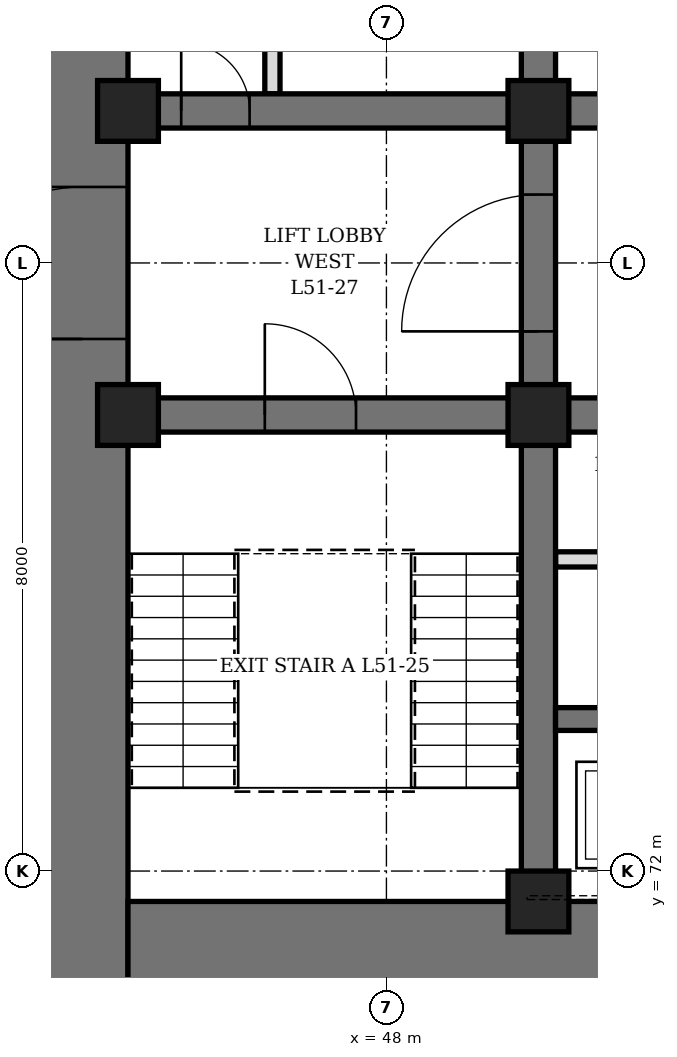
"""IFC4 building model, lengths in metres.
Left out: names, types, materials, properties, quantities, classifications, styles, units other than length and angle.
Written with IfcOpenShell. Run it as: python <this file> out.ifc"""

import sys

from ifc_helpers import new_model, si_unit, direction, frame, frame_2d, origin, origin_2d, place, context, subcontext, project, spatial, rectangle, hollow_rectangle, extrude, element, fill, save


model = new_model("IFC4")
c1 = context("Model", 3, precision=1e-05, world=origin(), true_north=direction((0.0, 1.0)))
c2 = subcontext(c1, "Body", "Model", "MODEL_VIEW")
j1 = project(units=[si_unit("LENGTHUNIT", "METRE"), si_unit("PLANEANGLEUNIT", "RADIAN")], contexts=[c1])
p1 = place(None, origin())
s1 = spatial("IfcSite", under=j1, at=p1, CompositionType="ELEMENT")
p2 = place(p1, origin())
s2 = spatial("IfcBuilding", under=s1, at=p2, CompositionType="ELEMENT")
p3 = place(p2, frame((0.0, 0.0, 227.5)))
s3 = spatial("IfcBuildingStorey", under=s2, at=p3, CompositionType="ELEMENT", Elevation=227.5)
p4 = place(p3, frame((44.0, 70.4, 0.0), z_axis=(0.0, 0.0, 1.0), x_axis=(0.0, 1.0, 0.0)))
e1 = element("IfcWall", 1, at=p4, inside=s3, PredefinedType="SHEAR", context=c2, shape_type="SweptSolid", body=[
    extrude(rectangle(XDim=19.2, YDim=1.2, at=frame_2d((9.6, 0.0))), origin(), (0.0, 0.0, 1.0), 4.2),
])
p5 = place(p4, frame((8.6, 0.0, 0.0)))
e2 = element("IfcOpeningElement", 2, at=p5, cuts=e1, PredefinedType="OPENING", context=c2, shape_type="SweptSolid", body=[
    extrude(rectangle(XDim=2.0, YDim=2.4, at=frame_2d((1.0, 1.2))), frame((0.0, 0.61, 0.0), z_axis=(0.0, -1.0, 0.0), x_axis=(1.0, 0.0, 0.0)), (0.0, 0.0, 1.0), 1.22),
])
p6 = place(p3, frame((44.6, 71.0, 0.0), z_axis=(0.0, 0.0, 1.0), x_axis=(1.0, 0.0, 0.0)))
e3 = element("IfcWall", 3, at=p6, inside=s3, PredefinedType="SHEAR", context=c2, shape_type="SweptSolid", body=[
    extrude(rectangle(XDim=22.8, YDim=1.2, at=frame_2d((11.4, 0.0))), origin(), (0.0, 0.0, 1.0), 4.2),
])
p7 = place(p6, frame((6.35, 0.0, 0.0)))
e4 = element("IfcOpeningElement", 4, at=p7, cuts=e3, PredefinedType="OPENING", context=c2, shape_type="SweptSolid", body=[
    extrude(rectangle(XDim=1.1, YDim=2.2, at=frame_2d((0.55, 1.1))), frame((0.0, 0.61, 0.0), z_axis=(0.0, -1.0, 0.0), x_axis=(1.0, 0.0, 0.0)), (0.0, 0.0, 1.0), 1.22),
])
p8 = place(p6, frame((9.35, 0.0, 0.0)))
e5 = element("IfcOpeningElement", 5, at=p8, cuts=e3, PredefinedType="OPENING", context=c2, shape_type="SweptSolid", body=[
    extrude(rectangle(XDim=1.1, YDim=2.2, at=frame_2d((0.55, 1.1))), frame((0.0, 0.61, 0.0), z_axis=(0.0, -1.0, 0.0), x_axis=(1.0, 0.0, 0.0)), (0.0, 0.0, 1.0), 1.22),
])
p9 = place(p6, frame((12.35, 0.0, 0.0)))
e6 = element("IfcOpeningElement", 6, at=p9, cuts=e3, PredefinedType="OPENING", context=c2, shape_type="SweptSolid", body=[
    extrude(rectangle(XDim=1.1, YDim=2.2, at=frame_2d((0.55, 1.1))), frame((0.0, 0.61, 0.0), z_axis=(0.0, -1.0, 0.0), x_axis=(1.0, 0.0, 0.0)), (0.0, 0.0, 1.0), 1.22),
])
p10 = place(p6, frame((15.35, 0.0, 0.0)))
e7 = element("IfcOpeningElement", 7, at=p10, cuts=e3, PredefinedType="OPENING", context=c2, shape_type="SweptSolid", body=[
    extrude(rectangle(XDim=1.1, YDim=2.2, at=frame_2d((0.55, 1.1))), frame((0.0, 0.61, 0.0), z_axis=(0.0, -1.0, 0.0), x_axis=(1.0, 0.0, 0.0)), (0.0, 0.0, 1.0), 1.22),
])
p11 = place(p3, frame((50.0, 71.6, 0.0), z_axis=(0.0, 0.0, 1.0), x_axis=(0.0, 1.0, 0.0)))
e8 = element("IfcWall", 8, at=p11, inside=s3, PredefinedType="SHEAR", context=c2, shape_type="SweptSolid", body=[
    extrude(rectangle(XDim=16.8, YDim=0.45, at=frame_2d((8.4, 0.0))), origin(), (0.0, 0.0, 1.0), 4.2),
])
p12 = place(p11, frame((7.5, 0.0, 0.0)))
e9 = element("IfcOpeningElement", 9, at=p12, cuts=e8, PredefinedType="OPENING", context=c2, shape_type="SweptSolid", body=[
    extrude(rectangle(XDim=1.8, YDim=2.4, at=frame_2d((0.9, 1.2))), frame((0.0, 0.235, 0.0), z_axis=(0.0, -1.0, 0.0), x_axis=(1.0, 0.0, 0.0)), (0.0, 0.0, 1.0), 0.47),
])
p13 = place(p3, frame((44.6, 78.0, 0.0), z_axis=(0.0, 0.0, 1.0), x_axis=(1.0, 0.0, 0.0)))
e10 = element("IfcWall", 10, at=p13, inside=s3, PredefinedType="SHEAR", context=c2, shape_type="SweptSolid", body=[
    extrude(rectangle(XDim=5.175, YDim=0.45, at=frame_2d((2.587, 0.0))), origin(), (0.0, 0.0, 1.0), 4.2),
])
p14 = place(p13, frame((1.8, 0.0, 0.0)))
e11 = element("IfcOpeningElement", 11, at=p14, cuts=e10, PredefinedType="OPENING", context=c2, shape_type="SweptSolid", body=[
    extrude(rectangle(XDim=1.2, YDim=2.1, at=frame_2d((0.6, 1.05))), frame((0.0, 0.235, 0.0), z_axis=(0.0, -1.0, 0.0), x_axis=(1.0, 0.0, 0.0)), (0.0, 0.0, 1.0), 0.47),
])
p15 = place(p3, frame((44.6, 82.0, 0.0), z_axis=(0.0, 0.0, 1.0), x_axis=(1.0, 0.0, 0.0)))
e12 = element("IfcWall", 12, at=p15, inside=s3, PredefinedType="SHEAR", context=c2, shape_type="SweptSolid", body=[
    extrude(rectangle(XDim=5.175, YDim=0.45, at=frame_2d((2.587, 0.0))), origin(), (0.0, 0.0, 1.0), 4.2),
])
p16 = place(p15, frame((0.7, 0.0, 0.0)))
e13 = element("IfcOpeningElement", 13, at=p16, cuts=e12, PredefinedType="OPENING", context=c2, shape_type="SweptSolid", body=[
    extrude(rectangle(XDim=0.9, YDim=2.1, at=frame_2d((0.45, 1.05))), frame((0.0, 0.235, 0.0), z_axis=(0.0, -1.0, 0.0), x_axis=(1.0, 0.0, 0.0)), (0.0, 0.0, 1.0), 0.47),
])
p17 = place(p3, frame((50.225, 78.0, 0.0), z_axis=(0.0, 0.0, 1.0), x_axis=(1.0, 0.0, 0.0)))
e14 = element("IfcWall", 14, at=p17, inside=s3, PredefinedType="SHEAR", context=c2, shape_type="SweptSolid", body=[
    extrude(rectangle(XDim=11.55, YDim=0.45, at=frame_2d((5.775, 0.0))), origin(), (0.0, 0.0, 1.0), 4.2),
])
p18 = place(p17, frame((0.825, 0.0, 0.0)))
e15 = element("IfcOpeningElement", 15, at=p18, cuts=e14, PredefinedType="OPENING", context=c2, shape_type="SweptSolid", body=[
    extrude(rectangle(XDim=0.9, YDim=2.1, at=frame_2d((0.45, 1.05))), frame((0.0, 0.235, 0.0), z_axis=(0.0, -1.0, 0.0), x_axis=(1.0, 0.0, 0.0)), (0.0, 0.0, 1.0), 0.47),
])
p19 = place(p17, frame((3.825, 0.0, 0.0)))
e16 = element("IfcOpeningElement", 16, at=p19, cuts=e14, PredefinedType="OPENING", context=c2, shape_type="SweptSolid", body=[
    extrude(rectangle(XDim=0.9, YDim=2.1, at=frame_2d((0.45, 1.05))), frame((0.0, 0.235, 0.0), z_axis=(0.0, -1.0, 0.0), x_axis=(1.0, 0.0, 0.0)), (0.0, 0.0, 1.0), 0.47),
])
p20 = place(p17, frame((6.825, 0.0, 0.0)))
e17 = element("IfcOpeningElement", 17, at=p20, cuts=e14, PredefinedType="OPENING", context=c2, shape_type="SweptSolid", body=[
    extrude(rectangle(XDim=0.9, YDim=2.1, at=frame_2d((0.45, 1.05))), frame((0.0, 0.235, 0.0), z_axis=(0.0, -1.0, 0.0), x_axis=(1.0, 0.0, 0.0)), (0.0, 0.0, 1.0), 0.47),
])
p21 = place(p17, frame((9.825, 0.0, 0.0)))
e18 = element("IfcOpeningElement", 18, at=p21, cuts=e14, PredefinedType="OPENING", context=c2, shape_type="SweptSolid", body=[
    extrude(rectangle(XDim=0.9, YDim=2.1, at=frame_2d((0.45, 1.05))), frame((0.0, 0.235, 0.0), z_axis=(0.0, -1.0, 0.0), x_axis=(1.0, 0.0, 0.0)), (0.0, 0.0, 1.0), 0.47),
])
p22 = place(p3, frame((50.225, 82.0, 0.0), z_axis=(0.0, 0.0, 1.0), x_axis=(1.0, 0.0, 0.0)))
e19 = element("IfcWall", 19, at=p22, inside=s3, PredefinedType="SHEAR", context=c2, shape_type="SweptSolid", body=[
    extrude(rectangle(XDim=11.55, YDim=0.45, at=frame_2d((5.775, 0.0))), origin(), (0.0, 0.0, 1.0), 4.2),
])
p23 = place(p22, frame((0.825, 0.0, 0.0)))
e20 = element("IfcOpeningElement", 20, at=p23, cuts=e19, PredefinedType="OPENING", context=c2, shape_type="SweptSolid", body=[
    extrude(rectangle(XDim=0.9, YDim=2.1, at=frame_2d((0.45, 1.05))), frame((0.0, 0.235, 0.0), z_axis=(0.0, -1.0, 0.0), x_axis=(1.0, 0.0, 0.0)), (0.0, 0.0, 1.0), 0.47),
])
p24 = place(p22, frame((3.825, 0.0, 0.0)))
e21 = element("IfcOpeningElement", 21, at=p24, cuts=e19, PredefinedType="OPENING", context=c2, shape_type="SweptSolid", body=[
    extrude(rectangle(XDim=0.9, YDim=2.1, at=frame_2d((0.45, 1.05))), frame((0.0, 0.235, 0.0), z_axis=(0.0, -1.0, 0.0), x_axis=(1.0, 0.0, 0.0)), (0.0, 0.0, 1.0), 0.47),
])
p25 = place(p22, frame((6.825, 0.0, 0.0)))
e22 = element("IfcOpeningElement", 22, at=p25, cuts=e19, PredefinedType="OPENING", context=c2, shape_type="SweptSolid", body=[
    extrude(rectangle(XDim=0.9, YDim=2.1, at=frame_2d((0.45, 1.05))), frame((0.0, 0.235, 0.0), z_axis=(0.0, -1.0, 0.0), x_axis=(1.0, 0.0, 0.0)), (0.0, 0.0, 1.0), 0.47),
])
p26 = place(p22, frame((9.825, 0.0, 0.0)))
e23 = element("IfcOpeningElement", 23, at=p26, cuts=e19, PredefinedType="OPENING", context=c2, shape_type="SweptSolid", body=[
    extrude(rectangle(XDim=0.9, YDim=2.1, at=frame_2d((0.45, 1.05))), frame((0.0, 0.235, 0.0), z_axis=(0.0, -1.0, 0.0), x_axis=(1.0, 0.0, 0.0)), (0.0, 0.0, 1.0), 0.47),
])
p27 = place(p3, frame((50.225, 74.0, 0.0), z_axis=(0.0, 0.0, 1.0), x_axis=(1.0, 0.0, 0.0)))
e24 = element("IfcWall", 24, at=p27, inside=s3, PredefinedType="SHEAR", context=c2, shape_type="SweptSolid", body=[
    extrude(rectangle(XDim=11.55, YDim=0.3, at=frame_2d((5.775, 0.0))), origin(), (0.0, 0.0, 1.0), 4.2),
])
for number, where, z_axis, x_axis in (
    (25, (44.6, 78.0, 0.0), (0.0, 0.0, 1.0), (1.0, 0.0, 0.0)),
    (26, (44.6, 82.0, 0.0), (0.0, 0.0, 1.0), (1.0, 0.0, 0.0)),
    (27, (50.0, 71.6, 0.0), (0.0, 0.0, 1.0), (1.0, 0.0, 0.0)),
    (28, (50.0, 78.0, 0.0), (0.0, 0.0, 1.0), (1.0, 0.0, 0.0)),
    (29, (50.0, 82.0, 0.0), (0.0, 0.0, 1.0), (1.0, 0.0, 0.0)),
):
    element("IfcColumn", number, at=place(p3, frame(where, z_axis=z_axis, x_axis=x_axis)), inside=s3, PredefinedType="COLUMN", context=c2, shape_type="SweptSolid", body=[
        extrude(hollow_rectangle(XDim=0.8, YDim=0.8, WallThickness=0.1, at=origin_2d()), origin(), (0.0, 0.0, 1.0), 4.2),
    ])
p28 = place(p3, frame((46.5, 82.225, 0.0), z_axis=(0.0, 0.0, 1.0), x_axis=(0.0, 1.0, 0.0)))
e30 = element("IfcWall", 30, at=p28, inside=s3, PredefinedType="PARTITIONING", context=c2, shape_type="SweptSolid", body=[
    extrude(rectangle(XDim=3.05, YDim=0.2, at=frame_2d((1.525, 0.0))), origin(), (0.0, 0.0, 1.0), 4.04),
])
p29 = place(p28, frame((1.075, 0.0, 0.0)))
e31 = element("IfcOpeningElement", 31, at=p29, cuts=e30, PredefinedType="OPENING", context=c2, shape_type="SweptSolid", body=[
    extrude(rectangle(XDim=0.9, YDim=2.1, at=frame_2d((0.45, 1.05))), frame((0.0, 0.11, 0.0), z_axis=(0.0, -1.0, 0.0), x_axis=(1.0, 0.0, 0.0)), (0.0, 0.0, 1.0), 0.22),
])
p30 = place(p3, frame((50.225, 76.1, 0.0), z_axis=(0.0, 0.0, 1.0), x_axis=(1.0, 0.0, 0.0)))
e32 = element("IfcWall", 32, at=p30, inside=s3, PredefinedType="PARTITIONING", context=c2, shape_type="SweptSolid", body=[
    extrude(rectangle(XDim=2.55, YDim=0.2, at=frame_2d((1.275, 0.0))), origin(), (0.0, 0.0, 1.0), 4.04),
])
p31 = place(p30, frame((0.825, 0.0, 0.0)))
e33 = element("IfcOpeningElement", 33, at=p31, cuts=e32, PredefinedType="OPENING", context=c2, shape_type="SweptSolid", body=[
    extrude(rectangle(XDim=0.9, YDim=2.1, at=frame_2d((0.45, 1.05))), frame((0.0, 0.11, 0.0), z_axis=(0.0, -1.0, 0.0), x_axis=(1.0, 0.0, 0.0)), (0.0, 0.0, 1.0), 0.22),
])
p32 = place(p16, origin())
e34 = element("IfcDoor", 34, at=p32, inside=s3, OperationType="SINGLE_SWING_LEFT", PredefinedType="DOOR", context=c2, shape_type="SweptSolid", body=[
    extrude(rectangle(XDim=0.9, YDim=2.1, at=frame_2d((0.45, 1.05))), frame((0.0, 0.225, 0.0), z_axis=(0.0, -1.0, 0.0), x_axis=(1.0, 0.0, 0.0)), (0.0, 0.0, 1.0), 0.449),
])
fill(e13, e34)
p33 = place(p14, origin())
e35 = element("IfcDoor", 35, at=p33, inside=s3, OperationType="SINGLE_SWING_LEFT", PredefinedType="DOOR", context=c2, shape_type="SweptSolid", body=[
    extrude(rectangle(XDim=1.2, YDim=2.1, at=frame_2d((0.6, 1.05))), frame((0.0, 0.225, 0.0), z_axis=(0.0, -1.0, 0.0), x_axis=(1.0, 0.0, 0.0)), (0.0, 0.0, 1.0), 0.449),
])
fill(e11, e35)
p34 = place(p5, origin())
e36 = element("IfcDoor", 36, at=p34, inside=s3, OperationType="DOUBLE_DOOR_SINGLE_SWING", PredefinedType="DOOR", context=c2, shape_type="SweptSolid", body=[
    extrude(rectangle(XDim=2.0, YDim=2.4, at=frame_2d((1.0, 1.2))), frame((0.0, 0.35, 0.0), z_axis=(0.0, -1.0, 0.0), x_axis=(1.0, 0.0, 0.0)), (0.0, 0.0, 1.0), 0.7),
])
fill(e2, e36)
p35 = place(p12, origin())
e37 = element("IfcDoor", 37, at=p35, inside=s3, OperationType="DOUBLE_DOOR_SINGLE_SWING", PredefinedType="DOOR", context=c2, shape_type="SweptSolid", body=[
    extrude(rectangle(XDim=1.8, YDim=2.4, at=frame_2d((0.9, 1.2))), frame((0.0, 0.225, 0.0), z_axis=(0.0, -1.0, 0.0), x_axis=(1.0, 0.0, 0.0)), (0.0, 0.0, 1.0), 0.449),
])
fill(e9, e37)
save(model, sys.argv[1])
